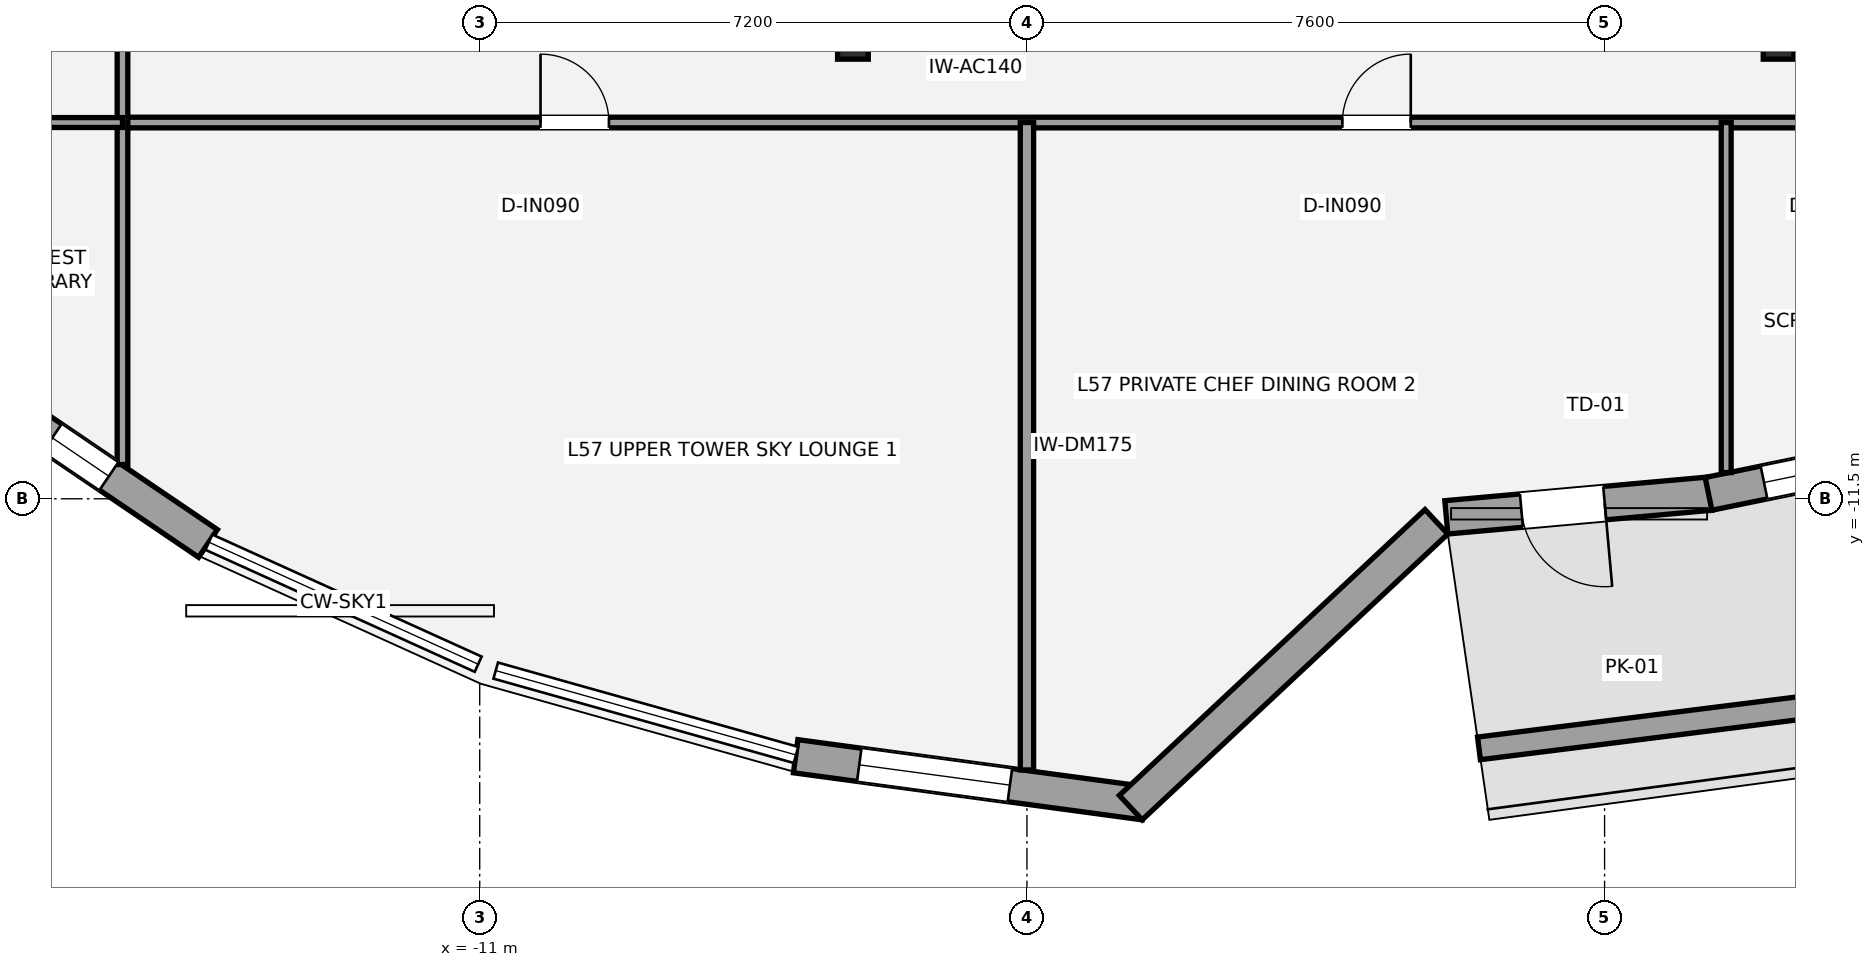
"""IFC4 building model, lengths in metres.
Left out: names, types, materials, properties, quantities, classifications, styles, units other than length and angle.
Written with IfcOpenShell. Run it as: python <this file> out.ifc"""

import sys

from ifc_helpers import new_model, si_unit, direction, frame, frame_2d, origin, origin_2d, place, context, subcontext, project, spatial, rectangle, i_section, extrude, element, fill, save


model = new_model("IFC4")
c1 = context("Model", 3, precision=1e-05, world=origin(), true_north=direction((0.0, 1.0)))
c2 = subcontext(c1, "Body", "Model", "MODEL_VIEW")
j1 = project(units=[si_unit("LENGTHUNIT", "METRE"), si_unit("PLANEANGLEUNIT", "RADIAN")], contexts=[c1])
p1 = place(None, origin())
s1 = spatial("IfcSite", under=j1, at=p1, CompositionType="ELEMENT")
p2 = place(p1, origin())
s2 = spatial("IfcBuilding", under=s1, at=p2, CompositionType="ELEMENT")
p3 = place(p2, frame((0.0, 0.0, 205.9)))
s3 = spatial("IfcBuildingStorey", under=s2, at=p3, CompositionType="ELEMENT", Elevation=205.9)
for number, where, z_axis, x_axis in (
    (1, (-6.09, -5.513, 0.0), (0.0, 0.0, 1.0), (1.0, 0.0, 0.0)),
    (2, (6.09, -5.513, 0.0), (0.0, 0.0, 1.0), (1.0, 0.0, 0.0)),
):
    element("IfcColumn", number, at=place(p3, frame(where, z_axis=z_axis, x_axis=x_axis)), inside=s3, PredefinedType="COLUMN", context=c2, shape_type="SweptSolid", body=[
        extrude(i_section(OverallWidth=0.404, OverallDepth=0.407, WebThickness=0.027, FlangeThickness=0.044, at=origin_2d()), origin(), (0.0, 0.0, 1.0), 4.1),
    ])
p4 = place(p3, frame((-14.575, -12.088, 0.0), z_axis=(0.0, 0.0, 1.0), x_axis=(-0.827641742214, 0.561256756347, 0.0)))
e3 = element("IfcWall", 3, at=p4, inside=s3, PredefinedType="STANDARD", context=c2, shape_type="SweptSolid", body=[
    extrude(rectangle(XDim=4.002, YDim=0.44, at=frame_2d((2.001, 0.0))), origin(), (0.0, 0.0, 1.0), 3.219),
])
p5 = place(p4, frame((1.576, 0.0, 0.58)))
e4 = element("IfcOpeningElement", 4, at=p5, cuts=e3, PredefinedType="OPENING", context=c2, shape_type="SweptSolid", body=[
    extrude(rectangle(XDim=0.9, YDim=1.35, at=frame_2d((0.45, 0.675))), frame((0.0, 0.23, 0.0), z_axis=(0.0, -1.0, 0.0), x_axis=(1.0, 0.0, 0.0)), (0.0, 0.0, 1.0), 0.46),
])
p6 = place(p3, frame((-2.254, -15.506, 0.0), z_axis=(0.0, 0.0, 1.0), x_axis=(-0.991027382985, 0.133658992119, 0.0)))
e5 = element("IfcWall", 5, at=p6, inside=s3, PredefinedType="STANDARD", context=c2, shape_type="SweptSolid", body=[
    extrude(rectangle(XDim=4.63, YDim=0.44, at=frame_2d((2.315, 0.0))), origin(), (0.0, 0.0, 1.0), 3.215),
])
p7 = place(p6, frame((1.786, 0.0, 0.6)))
e6 = element("IfcOpeningElement", 6, at=p7, cuts=e5, PredefinedType="OPENING", context=c2, shape_type="SweptSolid", body=[
    extrude(rectangle(XDim=2.0, YDim=2.1, at=frame_2d((1.0, 1.05))), frame((0.0, 0.23, 0.0), z_axis=(0.0, -1.0, 0.0), x_axis=(1.0, 0.0, 0.0)), (0.0, 0.0, 1.0), 0.46),
])
p8 = place(p3, frame((1.587, -11.803, 0.0), z_axis=(0.0, 0.0, 1.0), x_axis=(-0.730410553277, -0.683008362805, 0.0)))
e7 = element("IfcWall", 7, at=p8, inside=s3, PredefinedType="STANDARD", context=c2, shape_type="SweptSolid", body=[
    extrude(rectangle(XDim=5.506, YDim=0.44, at=frame_2d((2.753, 0.0))), origin(), (0.0, 0.0, 1.0), 3.219),
])
p9 = place(p3, frame((5.192, -11.432, 0.0), z_axis=(0.0, 0.0, 1.0), x_axis=(-0.995978811691, -0.089589099014, 0.0)))
e8 = element("IfcWall", 8, at=p9, inside=s3, PredefinedType="STANDARD", context=c2, shape_type="SweptSolid", body=[
    extrude(rectangle(XDim=3.488, YDim=0.44, at=frame_2d((1.744, 0.0))), origin(), (0.0, 0.0, 1.0), 3.219),
])
p10 = place(p9, frame((1.396, 0.0, 0.0)))
e9 = element("IfcOpeningElement", 9, at=p10, cuts=e8, PredefinedType="OPENING", context=c2, shape_type="SweptSolid", body=[
    extrude(rectangle(XDim=1.1, YDim=2.15, at=frame_2d((0.55, 1.075))), frame((0.0, 0.23, 0.0), z_axis=(0.0, -1.0, 0.0), x_axis=(1.0, 0.0, 0.0)), (0.0, 0.0, 1.0), 0.46),
])
p11 = place(p3, frame((8.587, -10.735, 0.0), z_axis=(0.0, 0.0, 1.0), x_axis=(-0.979641518613, -0.200754813168, 0.0)))
e10 = element("IfcWall", 10, at=p11, inside=s3, PredefinedType="STANDARD", context=c2, shape_type="SweptSolid", body=[
    extrude(rectangle(XDim=3.49, YDim=0.44, at=frame_2d((1.745, 0.0))), origin(), (0.0, 0.0, 1.0), 3.219),
])
p12 = place(p11, frame((0.745, 0.0, 0.6)))
e11 = element("IfcOpeningElement", 11, at=p12, cuts=e10, PredefinedType="OPENING", context=c2, shape_type="SweptSolid", body=[
    extrude(rectangle(XDim=2.0, YDim=2.1, at=frame_2d((1.0, 1.05))), frame((0.0, 0.23, 0.0), z_axis=(0.0, -1.0, 0.0), x_axis=(1.0, 0.0, 0.0)), (0.0, 0.0, 1.0), 0.46),
])
p13 = place(p3, frame((2.147, -14.784, 0.0), z_axis=(0.0, 0.0, 1.0), x_axis=(0.992200125786, 0.124655165919, 0.0)))
e12 = element("IfcWall", 12, at=p13, inside=s3, PredefinedType="PARAPET", context=c2, shape_type="SweptSolid", body=[
    extrude(rectangle(XDim=4.262, YDim=0.3, at=frame_2d((2.131, 0.0))), origin(), (0.0, 0.0, 1.0), 0.45),
])
p14 = place(p3, frame((-15.7, -6.55, 0.0), z_axis=(0.0, 0.0, 1.0), x_axis=(1.0, 0.0, 0.0)))
e13 = element("IfcWall", 13, at=p14, inside=s3, PredefinedType="PARTITIONING", context=c2, shape_type="SweptSolid", body=[
    extrude(rectangle(XDim=31.9, YDim=0.14, at=frame_2d((15.95, 0.0))), origin(), (0.0, 0.0, 1.0), 3.373),
])
p15 = place(p14, frame((5.5, 0.0, 0.0)))
e14 = element("IfcOpeningElement", 14, at=p15, cuts=e13, PredefinedType="OPENING", context=c2, shape_type="SweptSolid", body=[
    extrude(rectangle(XDim=0.9, YDim=2.1, at=frame_2d((0.45, 1.05))), frame((0.0, 0.08, 0.0), z_axis=(0.0, -1.0, 0.0), x_axis=(1.0, 0.0, 0.0)), (0.0, 0.0, 1.0), 0.16),
])
p16 = place(p14, frame((16.05, 0.0, 0.0)))
e15 = element("IfcOpeningElement", 15, at=p16, cuts=e13, PredefinedType="OPENING", context=c2, shape_type="SweptSolid", body=[
    extrude(rectangle(XDim=0.9, YDim=2.1, at=frame_2d((0.45, 1.05))), frame((0.0, 0.08, 0.0), z_axis=(0.0, -1.0, 0.0), x_axis=(1.0, 0.0, 0.0)), (0.0, 0.0, 1.0), 0.16),
])
p17 = place(p14, frame((22.446, 0.0, 0.0)))
e16 = element("IfcOpeningElement", 16, at=p17, cuts=e13, PredefinedType="OPENING", context=c2, shape_type="SweptSolid", body=[
    extrude(rectangle(XDim=0.9, YDim=2.1, at=frame_2d((0.45, 1.05))), frame((0.0, 0.08, 0.0), z_axis=(0.0, -1.0, 0.0), x_axis=(1.0, 0.0, 0.0)), (0.0, 0.0, 1.0), 0.16),
])
p18 = place(p14, frame((25.492, 0.0, 0.0)))
e17 = element("IfcOpeningElement", 17, at=p18, cuts=e13, PredefinedType="OPENING", context=c2, shape_type="SweptSolid", body=[
    extrude(rectangle(XDim=0.9, YDim=2.1, at=frame_2d((0.45, 1.05))), frame((0.0, 0.08, 0.0), z_axis=(0.0, -1.0, 0.0), x_axis=(1.0, 0.0, 0.0)), (0.0, 0.0, 1.0), 0.16),
])
p19 = place(p14, frame((29.096, 0.0, 0.0)))
e18 = element("IfcOpeningElement", 18, at=p19, cuts=e13, PredefinedType="OPENING", context=c2, shape_type="SweptSolid", body=[
    extrude(rectangle(XDim=0.9, YDim=2.1, at=frame_2d((0.45, 1.05))), frame((0.0, 0.08, 0.0), z_axis=(0.0, -1.0, 0.0), x_axis=(1.0, 0.0, 0.0)), (0.0, 0.0, 1.0), 0.16),
])
p20 = place(p3, frame((-15.7, -11.049, 0.0), z_axis=(0.0, 0.0, 1.0), x_axis=(0.0, 1.0, 0.0)))
e19 = element("IfcWall", 19, at=p20, inside=s3, PredefinedType="PARTITIONING", context=c2, shape_type="SweptSolid", body=[
    extrude(rectangle(XDim=13.449, YDim=0.14, at=frame_2d((6.725, 0.0))), origin(), (0.0, 0.0, 1.0), 3.307),
])
p21 = place(p20, frame((6.524, 0.0, 0.0)))
e20 = element("IfcOpeningElement", 20, at=p21, cuts=e19, PredefinedType="OPENING", context=c2, shape_type="SweptSolid", body=[
    extrude(rectangle(XDim=0.9, YDim=2.1, at=frame_2d((0.45, 1.05))), frame((0.0, 0.08, 0.0), z_axis=(0.0, -1.0, 0.0), x_axis=(1.0, 0.0, 0.0)), (0.0, 0.0, 1.0), 0.16),
])
p22 = place(p20, frame((11.36, 0.0, 0.0)))
e21 = element("IfcOpeningElement", 21, at=p22, cuts=e19, PredefinedType="OPENING", context=c2, shape_type="SweptSolid", body=[
    extrude(rectangle(XDim=0.9, YDim=2.1, at=frame_2d((0.45, 1.05))), frame((0.0, 0.08, 0.0), z_axis=(0.0, -1.0, 0.0), x_axis=(1.0, 0.0, 0.0)), (0.0, 0.0, 1.0), 0.16),
])
p23 = place(p3, frame((-3.8, -15.067, 0.0), z_axis=(0.0, 0.0, 1.0), x_axis=(0.0, 1.0, 0.0)))
e22 = element("IfcWall", 22, at=p23, inside=s3, PredefinedType="PARTITIONING", context=c2, shape_type="SweptSolid", body=[
    extrude(rectangle(XDim=8.517, YDim=0.175, at=frame_2d((4.259, 0.0))), origin(), (0.0, 0.0, 1.0), 3.373),
])
p24 = place(p3, frame((5.4, -11.155, 0.0), z_axis=(0.0, 0.0, 1.0), x_axis=(0.0, 1.0, 0.0)))
e23 = element("IfcWall", 23, at=p24, inside=s3, PredefinedType="PARTITIONING", context=c2, shape_type="SweptSolid", body=[
    extrude(rectangle(XDim=4.605, YDim=0.13, at=frame_2d((2.302, 0.0))), origin(), (0.0, 0.0, 1.0), 3.92),
])
p25 = place(p3, frame((-20.573, -6.55, 0.0), z_axis=(0.0, 0.0, 1.0), x_axis=(1.0, 0.0, 0.0)))
e24 = element("IfcWall", 24, at=p25, inside=s3, PredefinedType="PARTITIONING", context=c2, shape_type="SweptSolid", body=[
    extrude(rectangle(XDim=4.873, YDim=0.13, at=frame_2d((2.436, 0.0))), origin(), (0.0, 0.0, 1.0), 3.217),
])
p26 = place(p25, frame((0.75, 0.0, 0.0)))
e25 = element("IfcOpeningElement", 25, at=p26, cuts=e24, PredefinedType="OPENING", context=c2, shape_type="SweptSolid", body=[
    extrude(rectangle(XDim=0.9, YDim=2.1, at=frame_2d((0.45, 1.05))), frame((0.0, 0.075, 0.0), z_axis=(0.0, -1.0, 0.0), x_axis=(1.0, 0.0, 0.0)), (0.0, 0.0, 1.0), 0.15),
])
p27 = place(p5, origin())
e26 = element("IfcWindow", 26, at=p27, inside=s3, PartitioningType="SINGLE_PANEL", PredefinedType="WINDOW", context=c2, shape_type="SweptSolid", body=[
    extrude(rectangle(XDim=0.9, YDim=1.35, at=frame_2d((0.45, 0.675))), frame((0.0, -0.01, 0.0), z_axis=(0.0, -1.0, 0.0), x_axis=(1.0, 0.0, 0.0)), (0.0, 0.0, 1.0), 0.06),
])
fill(e4, e26)
p28 = place(p7, origin())
e27 = element("IfcWindow", 27, at=p28, inside=s3, PartitioningType="SINGLE_PANEL", PredefinedType="WINDOW", context=c2, shape_type="SweptSolid", body=[
    extrude(rectangle(XDim=2.0, YDim=2.1, at=frame_2d((1.0, 1.05))), frame((0.0, -0.01, 0.0), z_axis=(0.0, -1.0, 0.0), x_axis=(1.0, 0.0, 0.0)), (0.0, 0.0, 1.0), 0.06),
])
fill(e6, e27)
p29 = place(p10, origin())
e28 = element("IfcDoor", 28, at=p29, inside=s3, OperationType="SINGLE_SWING_LEFT", PredefinedType="DOOR", context=c2, shape_type="SweptSolid", body=[
    extrude(rectangle(XDim=1.1, YDim=2.15, at=frame_2d((0.55, 1.075))), frame((0.0, 0.025, 0.0), z_axis=(0.0, -1.0, 0.0), x_axis=(1.0, 0.0, 0.0)), (0.0, 0.0, 1.0), 0.05),
])
fill(e9, e28)
p30 = place(p12, origin())
e29 = element("IfcWindow", 29, at=p30, inside=s3, PartitioningType="SINGLE_PANEL", PredefinedType="WINDOW", context=c2, shape_type="SweptSolid", body=[
    extrude(rectangle(XDim=2.0, YDim=2.1, at=frame_2d((1.0, 1.05))), frame((0.0, -0.01, 0.0), z_axis=(0.0, -1.0, 0.0), x_axis=(1.0, 0.0, 0.0)), (0.0, 0.0, 1.0), 0.06),
])
fill(e11, e29)
p31 = place(p15, origin())
e30 = element("IfcDoor", 30, at=p31, inside=s3, OperationType="SINGLE_SWING_LEFT", PredefinedType="DOOR", context=c2, shape_type="SweptSolid", body=[
    extrude(rectangle(XDim=0.9, YDim=2.1, at=frame_2d((0.45, 1.05))), frame((0.0, 0.025, 0.0), z_axis=(0.0, -1.0, 0.0), x_axis=(1.0, 0.0, 0.0)), (0.0, 0.0, 1.0), 0.05),
])
fill(e14, e30)
p32 = place(p16, origin())
e31 = element("IfcDoor", 31, at=p32, inside=s3, OperationType="SINGLE_SWING_RIGHT", PredefinedType="DOOR", context=c2, shape_type="SweptSolid", body=[
    extrude(rectangle(XDim=0.9, YDim=2.1, at=frame_2d((0.45, 1.05))), frame((0.0, 0.025, 0.0), z_axis=(0.0, -1.0, 0.0), x_axis=(1.0, 0.0, 0.0)), (0.0, 0.0, 1.0), 0.05),
])
fill(e15, e31)
save(model, sys.argv[1])
